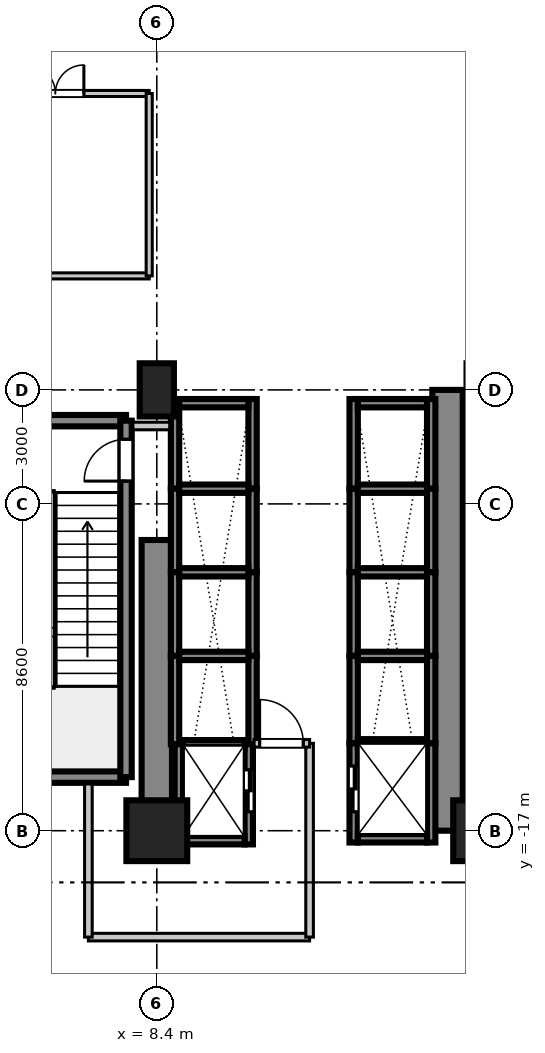
"""IFC4 building model, lengths in metres.
Left out: names, types, materials, properties, quantities, classifications, styles, units other than length and angle.
Written with IfcOpenShell. Run it as: python <this file> out.ifc"""

import sys

from ifc_helpers import new_model, si_unit, direction, frame, frame_2d, origin, origin_2d, place, context, subcontext, project, spatial, rectangle, extrude, source, transform, mapped, element, fill, save


model = new_model("IFC4")
c1 = context("Model", 3, precision=1e-05, world=origin(), true_north=direction((0.0, 1.0)))
c2 = subcontext(c1, "Body", "Model", "MODEL_VIEW")
j1 = project(units=[si_unit("LENGTHUNIT", "METRE"), si_unit("PLANEANGLEUNIT", "RADIAN")], contexts=[c1])
p1 = place(None, origin())
s1 = spatial("IfcSite", under=j1, at=p1, CompositionType="ELEMENT")
p2 = place(p1, origin())
s2 = spatial("IfcBuilding", under=s1, at=p2, CompositionType="ELEMENT")
p3 = place(p2, frame((0.0, 0.0, 10.8)))
s3 = spatial("IfcBuildingStorey", under=s2, at=p3, CompositionType="ELEMENT", Elevation=10.8)
m1 = source(origin(), c2, "Body", "SweptSolid", [
    extrude(rectangle(XDim=1.6, YDim=1.6, at=origin_2d()), origin(), (0.0, 0.0, 1.0), 5.355),
])
p4 = place(p3, frame((8.4, -17.0, 0.0), z_axis=(0.0, 0.0, 1.0), x_axis=(1.0, 0.0, 0.0)))
e1 = element("IfcColumn", 1, at=p4, inside=s3, PredefinedType="COLUMN", context=c2, shape_type="MappedRepresentation", body=[
    mapped(m1, transform((0.0, 0.0, 0.0), scale=1.0)),
])
m2 = source(origin(), c2, "Body", "SweptSolid", [
    extrude(rectangle(XDim=0.9, YDim=1.4, at=origin_2d()), origin(), (0.0, 0.0, 1.0), 5.355),
])
p5 = place(p3, frame((8.4, -5.4, 0.0), z_axis=(0.0, 0.0, 1.0), x_axis=(1.0, 0.0, 0.0)))
e2 = element("IfcColumn", 2, at=p5, inside=s3, PredefinedType="PILASTER", context=c2, shape_type="MappedRepresentation", body=[
    mapped(m2, transform((0.0, 0.0, 0.0), scale=1.0)),
])
p6 = place(p3, frame((17.0, -17.0, 0.0), z_axis=(0.0, 0.0, 1.0), x_axis=(1.0, 0.0, 0.0)))
e3 = element("IfcColumn", 3, at=p6, inside=s3, PredefinedType="COLUMN", context=c2, shape_type="MappedRepresentation", body=[
    mapped(m1, transform((0.0, 0.0, 0.0), scale=1.0)),
])
m3 = source(origin(), c2, "Body", "SweptSolid", [
    extrude(rectangle(XDim=7.65, YDim=0.8, at=frame_2d((3.825, 0.0))), origin(), (0.0, 0.0, 1.0), 5.06),
])
p7 = place(p3, frame((8.4, -17.0, 0.0), z_axis=(0.0, 0.0, 1.0), x_axis=(0.0, 1.0, 0.0)))
e4 = element("IfcWall", 4, at=p7, inside=s3, PredefinedType="SHEAR", context=c2, shape_type="MappedRepresentation", body=[
    mapped(m3, transform((0.0, 0.0, 0.0), scale=1.0)),
])
m4 = source(origin(), c2, "Body", "SweptSolid", [
    extrude(rectangle(XDim=11.6, YDim=0.8, at=frame_2d((5.8, 0.0))), origin(), (0.0, 0.0, 1.0), 5.06),
])
p8 = place(p3, frame((16.05, -17.0, 0.0), z_axis=(0.0, 0.0, 1.0), x_axis=(0.0, 1.0, 0.0)))
e5 = element("IfcWall", 5, at=p8, inside=s3, PredefinedType="SHEAR", context=c2, shape_type="MappedRepresentation", body=[
    mapped(m4, transform((0.0, 0.0, 0.0), scale=1.0)),
])
m5 = source(origin(), c2, "Body", "SweptSolid", [
    extrude(rectangle(XDim=3.98, YDim=0.3, at=frame_2d((1.99, 0.0))), origin(), (0.0, 0.0, 1.0), 5.06),
])
for number, where, z_axis, x_axis in (
    (6, (3.61, -15.59, 0.0), (0.0, 0.0, 1.0), (1.0, 0.0, 0.0)),
    (7, (3.61, -6.21, 0.0), (0.0, 0.0, 1.0), (1.0, 0.0, 0.0)),
):
    element("IfcWall", number, at=place(p3, frame(where, z_axis=z_axis, x_axis=x_axis)), inside=s3, PredefinedType="SHEAR", context=c2, shape_type="MappedRepresentation", body=[
        mapped(m5, transform((0.0, 0.0, 0.0), scale=1.0)),
    ])
m6 = source(origin(), c2, "Body", "SweptSolid", [
    extrude(rectangle(XDim=9.38, YDim=0.3, at=frame_2d((4.69, 0.0))), origin(), (0.0, 0.0, 1.0), 5.06),
])
p9 = place(p3, frame((7.59, -15.59, 0.0), z_axis=(0.0, 0.0, 1.0), x_axis=(0.0, 1.0, 0.0)))
e8 = element("IfcWall", 8, at=p9, inside=s3, PredefinedType="SHEAR", context=c2, shape_type="MappedRepresentation", body=[
    mapped(m6, transform((0.0, 0.0, 0.0), scale=1.0)),
])
p10 = place(p9, frame((7.79, 0.0, 0.0)))
e9 = element("IfcOpeningElement", 9, at=p10, cuts=e8, PredefinedType="OPENING", context=c2, shape_type="SweptSolid", body=[
    extrude(rectangle(XDim=1.1, YDim=2.15, at=frame_2d((0.55, 1.075))), frame((0.0, 0.16, 0.0), z_axis=(0.0, -1.0, 0.0), x_axis=(1.0, 0.0, 0.0)), (0.0, 0.0, 1.0), 0.32),
])
m7 = source(origin(), c2, "Body", "SweptSolid", [
    extrude(rectangle(XDim=2.36, YDim=0.22, at=frame_2d((1.18, 0.0))), origin(), (0.0, 0.0, 1.0), 5.06),
])
for number, where, z_axis, x_axis in (
    (10, (13.58, -8.0, 0.0), (0.0, 0.0, 1.0), (0.0, 1.0, 0.0)),
    (11, (15.62, -8.0, 0.0), (0.0, 0.0, 1.0), (0.0, 1.0, 0.0)),
):
    element("IfcWall", number, at=place(p3, frame(where, z_axis=z_axis, x_axis=x_axis)), inside=s3, PredefinedType="SHEAR", context=c2, shape_type="MappedRepresentation", body=[
        mapped(m7, transform((0.0, 0.0, 0.0), scale=1.0)),
    ])
m8 = source(origin(), c2, "Body", "SweptSolid", [
    extrude(rectangle(XDim=1.82, YDim=0.22, at=frame_2d((0.91, 0.0))), origin(), (0.0, 0.0, 1.0), 5.06),
])
p11 = place(p3, frame((13.69, -5.75, 0.0), z_axis=(0.0, 0.0, 1.0), x_axis=(1.0, 0.0, 0.0)))
e12 = element("IfcWall", 12, at=p11, inside=s3, PredefinedType="SHEAR", context=c2, shape_type="MappedRepresentation", body=[
    mapped(m8, transform((0.0, 0.0, 0.0), scale=1.0)),
])
m9 = source(origin(), c2, "Body", "SweptSolid", [
    extrude(rectangle(XDim=2.2, YDim=0.22, at=frame_2d((1.1, 0.0))), origin(), (0.0, 0.0, 1.0), 5.06),
])
for number, where, z_axis, x_axis in (
    (13, (13.58, -10.2, 0.0), (0.0, 0.0, 1.0), (0.0, 1.0, 0.0)),
    (14, (15.62, -10.2, 0.0), (0.0, 0.0, 1.0), (0.0, 1.0, 0.0)),
):
    element("IfcWall", number, at=place(p3, frame(where, z_axis=z_axis, x_axis=x_axis)), inside=s3, PredefinedType="SHEAR", context=c2, shape_type="MappedRepresentation", body=[
        mapped(m9, transform((0.0, 0.0, 0.0), scale=1.0)),
    ])
m10 = source(origin(), c2, "Body", "SweptSolid", [
    extrude(rectangle(XDim=1.82, YDim=0.22, at=frame_2d((0.91, 0.0))), origin(), (0.0, 0.0, 1.0), 5.4),
])
p12 = place(p3, frame((13.69, -8.0, 0.0), z_axis=(0.0, 0.0, 1.0), x_axis=(1.0, 0.0, 0.0)))
e15 = element("IfcWall", 15, at=p12, inside=s3, PredefinedType="SHEAR", context=c2, shape_type="MappedRepresentation", body=[
    mapped(m10, transform((0.0, 0.0, 0.0), scale=1.0)),
])
for number, where, z_axis, x_axis in (
    (16, (13.58, -12.4, 0.0), (0.0, 0.0, 1.0), (0.0, 1.0, 0.0)),
    (17, (15.62, -12.4, 0.0), (0.0, 0.0, 1.0), (0.0, 1.0, 0.0)),
):
    element("IfcWall", number, at=place(p3, frame(where, z_axis=z_axis, x_axis=x_axis)), inside=s3, PredefinedType="SHEAR", context=c2, shape_type="MappedRepresentation", body=[
        mapped(m9, transform((0.0, 0.0, 0.0), scale=1.0)),
    ])
p13 = place(p3, frame((13.69, -10.2, 0.0), z_axis=(0.0, 0.0, 1.0), x_axis=(1.0, 0.0, 0.0)))
e18 = element("IfcWall", 18, at=p13, inside=s3, PredefinedType="SHEAR", context=c2, shape_type="MappedRepresentation", body=[
    mapped(m10, transform((0.0, 0.0, 0.0), scale=1.0)),
])
m11 = source(origin(), c2, "Body", "SweptSolid", [
    extrude(rectangle(XDim=2.3, YDim=0.22, at=frame_2d((1.15, 0.0))), origin(), (0.0, 0.0, 1.0), 5.06),
])
for number, where, z_axis, x_axis in (
    (19, (13.58, -14.7, 0.0), (0.0, 0.0, 1.0), (0.0, 1.0, 0.0)),
    (20, (15.62, -14.7, 0.0), (0.0, 0.0, 1.0), (0.0, 1.0, 0.0)),
):
    element("IfcWall", number, at=place(p3, frame(where, z_axis=z_axis, x_axis=x_axis)), inside=s3, PredefinedType="SHEAR", context=c2, shape_type="MappedRepresentation", body=[
        mapped(m11, transform((0.0, 0.0, 0.0), scale=1.0)),
    ])
p14 = place(p3, frame((13.69, -12.4, 0.0), z_axis=(0.0, 0.0, 1.0), x_axis=(1.0, 0.0, 0.0)))
e21 = element("IfcWall", 21, at=p14, inside=s3, PredefinedType="SHEAR", context=c2, shape_type="MappedRepresentation", body=[
    mapped(m10, transform((0.0, 0.0, 0.0), scale=1.0)),
])
for number, where, z_axis, x_axis in (
    (22, (8.88, -8.0, 0.0), (0.0, 0.0, 1.0), (0.0, 1.0, 0.0)),
    (23, (10.92, -8.0, 0.0), (0.0, 0.0, 1.0), (0.0, 1.0, 0.0)),
):
    element("IfcWall", number, at=place(p3, frame(where, z_axis=z_axis, x_axis=x_axis)), inside=s3, PredefinedType="SHEAR", context=c2, shape_type="MappedRepresentation", body=[
        mapped(m7, transform((0.0, 0.0, 0.0), scale=1.0)),
    ])
p15 = place(p3, frame((8.99, -5.75, 0.0), z_axis=(0.0, 0.0, 1.0), x_axis=(1.0, 0.0, 0.0)))
e24 = element("IfcWall", 24, at=p15, inside=s3, PredefinedType="SHEAR", context=c2, shape_type="MappedRepresentation", body=[
    mapped(m8, transform((0.0, 0.0, 0.0), scale=1.0)),
])
for number, where, z_axis, x_axis in (
    (25, (8.88, -10.2, 0.0), (0.0, 0.0, 1.0), (0.0, 1.0, 0.0)),
    (26, (10.92, -10.2, 0.0), (0.0, 0.0, 1.0), (0.0, 1.0, 0.0)),
):
    element("IfcWall", number, at=place(p3, frame(where, z_axis=z_axis, x_axis=x_axis)), inside=s3, PredefinedType="SHEAR", context=c2, shape_type="MappedRepresentation", body=[
        mapped(m9, transform((0.0, 0.0, 0.0), scale=1.0)),
    ])
p16 = place(p3, frame((8.99, -8.0, 0.0), z_axis=(0.0, 0.0, 1.0), x_axis=(1.0, 0.0, 0.0)))
e27 = element("IfcWall", 27, at=p16, inside=s3, PredefinedType="SHEAR", context=c2, shape_type="MappedRepresentation", body=[
    mapped(m10, transform((0.0, 0.0, 0.0), scale=1.0)),
])
for number, where, z_axis, x_axis in (
    (28, (8.88, -12.4, 0.0), (0.0, 0.0, 1.0), (0.0, 1.0, 0.0)),
    (29, (10.92, -12.4, 0.0), (0.0, 0.0, 1.0), (0.0, 1.0, 0.0)),
):
    element("IfcWall", number, at=place(p3, frame(where, z_axis=z_axis, x_axis=x_axis)), inside=s3, PredefinedType="SHEAR", context=c2, shape_type="MappedRepresentation", body=[
        mapped(m9, transform((0.0, 0.0, 0.0), scale=1.0)),
    ])
p17 = place(p3, frame((8.99, -10.2, 0.0), z_axis=(0.0, 0.0, 1.0), x_axis=(1.0, 0.0, 0.0)))
e30 = element("IfcWall", 30, at=p17, inside=s3, PredefinedType="SHEAR", context=c2, shape_type="MappedRepresentation", body=[
    mapped(m10, transform((0.0, 0.0, 0.0), scale=1.0)),
])
m12 = source(origin(), c2, "Body", "SweptSolid", [
    extrude(rectangle(XDim=2.325, YDim=0.22, at=frame_2d((1.163, 0.0))), origin(), (0.0, 0.0, 1.0), 5.06),
])
for number, where, z_axis, x_axis in (
    (31, (8.88, -14.725, 0.0), (0.0, 0.0, 1.0), (0.0, 1.0, 0.0)),
    (32, (10.92, -14.725, 0.0), (0.0, 0.0, 1.0), (0.0, 1.0, 0.0)),
):
    element("IfcWall", number, at=place(p3, frame(where, z_axis=z_axis, x_axis=x_axis)), inside=s3, PredefinedType="SHEAR", context=c2, shape_type="MappedRepresentation", body=[
        mapped(m12, transform((0.0, 0.0, 0.0), scale=1.0)),
    ])
p18 = place(p3, frame((8.99, -12.4, 0.0), z_axis=(0.0, 0.0, 1.0), x_axis=(1.0, 0.0, 0.0)))
e33 = element("IfcWall", 33, at=p18, inside=s3, PredefinedType="SHEAR", context=c2, shape_type="MappedRepresentation", body=[
    mapped(m10, transform((0.0, 0.0, 0.0), scale=1.0)),
])
m13 = source(origin(), c2, "Body", "SweptSolid", [
    extrude(rectangle(XDim=2.635, YDim=0.22, at=frame_2d((1.317, 0.0))), origin(), (0.0, 0.0, 1.0), 5.06),
])
p19 = place(p3, frame((8.98, -17.36, 0.0), z_axis=(0.0, 0.0, 1.0), x_axis=(0.0, 1.0, 0.0)))
e34 = element("IfcWall", 34, at=p19, inside=s3, PredefinedType="SHEAR", context=c2, shape_type="MappedRepresentation", body=[
    mapped(m13, transform((0.0, 0.0, 0.0), scale=1.0)),
])
p20 = place(p3, frame((10.82, -17.36, 0.0), z_axis=(0.0, 0.0, 1.0), x_axis=(0.0, 1.0, 0.0)))
e35 = element("IfcWall", 35, at=p20, inside=s3, PredefinedType="SHEAR", context=c2, shape_type="MappedRepresentation", body=[
    mapped(m13, transform((0.0, 0.0, 0.0), scale=1.0)),
])
p21 = place(p20, frame((0.86, 0.0, 0.0)))
e36 = element("IfcOpeningElement", 36, at=p21, cuts=e35, PredefinedType="OPENING", context=c2, shape_type="SweptSolid", body=[
    extrude(rectangle(XDim=1.1, YDim=2.2, at=frame_2d((0.55, 1.1))), frame((0.0, 0.12, 0.0), z_axis=(0.0, -1.0, 0.0), x_axis=(1.0, 0.0, 0.0)), (0.0, 0.0, 1.0), 0.24),
])
m14 = source(origin(), c2, "Body", "SweptSolid", [
    extrude(rectangle(XDim=1.62, YDim=0.22, at=frame_2d((0.81, 0.0))), origin(), (0.0, 0.0, 1.0), 5.06),
])
p22 = place(p3, frame((9.09, -17.25, 0.0), z_axis=(0.0, 0.0, 1.0), x_axis=(1.0, 0.0, 0.0)))
e37 = element("IfcWall", 37, at=p22, inside=s3, PredefinedType="SHEAR", context=c2, shape_type="MappedRepresentation", body=[
    mapped(m14, transform((0.0, 0.0, 0.0), scale=1.0)),
])
m15 = source(origin(), c2, "Body", "SweptSolid", [
    extrude(rectangle(XDim=1.62, YDim=0.22, at=frame_2d((0.81, 0.0))), origin(), (0.0, 0.0, 1.0), 5.4),
])
p23 = place(p3, frame((9.09, -14.725, 0.0), z_axis=(0.0, 0.0, 1.0), x_axis=(1.0, 0.0, 0.0)))
e38 = element("IfcWall", 38, at=p23, inside=s3, PredefinedType="SHEAR", context=c2, shape_type="MappedRepresentation", body=[
    mapped(m15, transform((0.0, 0.0, 0.0), scale=1.0)),
])
m16 = source(origin(), c2, "Body", "SweptSolid", [
    extrude(rectangle(XDim=2.61, YDim=0.22, at=frame_2d((1.305, 0.0))), origin(), (0.0, 0.0, 1.0), 5.06),
])
p24 = place(p3, frame((13.58, -17.31, 0.0), z_axis=(0.0, 0.0, 1.0), x_axis=(0.0, 1.0, 0.0)))
e39 = element("IfcWall", 39, at=p24, inside=s3, PredefinedType="SHEAR", context=c2, shape_type="MappedRepresentation", body=[
    mapped(m16, transform((0.0, 0.0, 0.0), scale=1.0)),
])
p25 = place(p24, frame((0.81, 0.0, 0.0)))
e40 = element("IfcOpeningElement", 40, at=p25, cuts=e39, PredefinedType="OPENING", context=c2, shape_type="SweptSolid", body=[
    extrude(rectangle(XDim=1.2, YDim=2.2, at=frame_2d((0.6, 1.1))), frame((0.0, 0.12, 0.0), z_axis=(0.0, -1.0, 0.0), x_axis=(1.0, 0.0, 0.0)), (0.0, 0.0, 1.0), 0.24),
])
p26 = place(p3, frame((15.62, -17.31, 0.0), z_axis=(0.0, 0.0, 1.0), x_axis=(0.0, 1.0, 0.0)))
e41 = element("IfcWall", 41, at=p26, inside=s3, PredefinedType="SHEAR", context=c2, shape_type="MappedRepresentation", body=[
    mapped(m16, transform((0.0, 0.0, 0.0), scale=1.0)),
])
p27 = place(p3, frame((13.69, -17.2, 0.0), z_axis=(0.0, 0.0, 1.0), x_axis=(1.0, 0.0, 0.0)))
e42 = element("IfcWall", 42, at=p27, inside=s3, PredefinedType="SHEAR", context=c2, shape_type="MappedRepresentation", body=[
    mapped(m8, transform((0.0, 0.0, 0.0), scale=1.0)),
])
p28 = place(p3, frame((13.69, -14.7, 0.0), z_axis=(0.0, 0.0, 1.0), x_axis=(1.0, 0.0, 0.0)))
e43 = element("IfcWall", 43, at=p28, inside=s3, PredefinedType="SHEAR", context=c2, shape_type="MappedRepresentation", body=[
    mapped(m10, transform((0.0, 0.0, 0.0), scale=1.0)),
])
m17 = source(origin(), c2, "Body", "SweptSolid", [
    extrude(rectangle(XDim=5.82, YDim=0.2, at=frame_2d((2.91, 0.0))), origin(), (0.0, 0.0, 1.0), 3.4),
])
p29 = place(p3, frame((6.6, -19.8, 0.0), z_axis=(0.0, 0.0, 1.0), x_axis=(1.0, 0.0, 0.0)))
e44 = element("IfcWall", 44, at=p29, inside=s3, PredefinedType="PARTITIONING", context=c2, shape_type="MappedRepresentation", body=[
    mapped(m17, transform((0.0, 0.0, 0.0), scale=1.0)),
])
m18 = source(origin(), c2, "Body", "SweptSolid", [
    extrude(rectangle(XDim=4.03, YDim=0.2, at=frame_2d((2.015, 0.0))), origin(), (0.0, 0.0, 1.0), 3.4),
])
p30 = place(p3, frame((6.6, -19.8, 0.0), z_axis=(0.0, 0.0, 1.0), x_axis=(0.0, 1.0, 0.0)))
e45 = element("IfcWall", 45, at=p30, inside=s3, PredefinedType="PARTITIONING", context=c2, shape_type="MappedRepresentation", body=[
    mapped(m18, transform((0.0, 0.0, 0.0), scale=1.0)),
])
m19 = source(origin(), c2, "Body", "SweptSolid", [
    extrude(rectangle(XDim=5.1, YDim=0.2, at=frame_2d((2.55, 0.0))), origin(), (0.0, 0.0, 1.0), 3.4),
])
p31 = place(p3, frame((12.42, -19.8, 0.0), z_axis=(0.0, 0.0, 1.0), x_axis=(0.0, 1.0, 0.0)))
e46 = element("IfcWall", 46, at=p31, inside=s3, PredefinedType="PARTITIONING", context=c2, shape_type="MappedRepresentation", body=[
    mapped(m19, transform((0.0, 0.0, 0.0), scale=1.0)),
])
m20 = source(origin(), c2, "Body", "SweptSolid", [
    extrude(rectangle(XDim=1.46, YDim=0.2, at=frame_2d((0.73, 0.0))), origin(), (0.0, 0.0, 1.0), 3.4),
])
p32 = place(p3, frame((10.96, -14.7, 0.0), z_axis=(0.0, 0.0, 1.0), x_axis=(1.0, 0.0, 0.0)))
e47 = element("IfcWall", 47, at=p32, inside=s3, PredefinedType="PARTITIONING", context=c2, shape_type="MappedRepresentation", body=[
    mapped(m20, transform((0.0, 0.0, 0.0), scale=1.0)),
])
p33 = place(p32, frame((0.145, 0.0, 0.0)))
e48 = element("IfcOpeningElement", 48, at=p33, cuts=e47, PredefinedType="OPENING", context=c2, shape_type="SweptSolid", body=[
    extrude(rectangle(XDim=1.15, YDim=2.15, at=frame_2d((0.575, 1.075))), frame((0.0, 0.11, 0.0), z_axis=(0.0, -1.0, 0.0), x_axis=(1.0, 0.0, 0.0)), (0.0, 0.0, 1.0), 0.22),
])
m21 = source(origin(), c2, "Body", "SweptSolid", [
    extrude(rectangle(XDim=0.97, YDim=0.2, at=frame_2d((0.485, 0.0))), origin(), (0.0, 0.0, 1.0), 3.4),
])
p34 = place(p3, frame((7.77, -6.35, 0.0), z_axis=(0.0, 0.0, 1.0), x_axis=(1.0, 0.0, 0.0)))
e49 = element("IfcWall", 49, at=p34, inside=s3, PredefinedType="PARTITIONING", context=c2, shape_type="MappedRepresentation", body=[
    mapped(m21, transform((0.0, 0.0, 0.0), scale=1.0)),
])
m22 = source(origin(), c2, "Body", "SweptSolid", [
    extrude(rectangle(XDim=12.2, YDim=0.16, at=frame_2d((6.1, 0.0))), origin(), (0.0, 0.0, 1.0), 3.4),
])
p35 = place(p3, frame((-4.0, -2.4, 0.0), z_axis=(0.0, 0.0, 1.0), x_axis=(1.0, 0.0, 0.0)))
e50 = element("IfcWall", 50, at=p35, inside=s3, PredefinedType="PARTITIONING", context=c2, shape_type="MappedRepresentation", body=[
    mapped(m22, transform((0.0, 0.0, 0.0), scale=1.0)),
])
p36 = place(p3, frame((-4.0, 2.4, 0.0), z_axis=(0.0, 0.0, 1.0), x_axis=(1.0, 0.0, 0.0)))
e51 = element("IfcWall", 51, at=p36, inside=s3, PredefinedType="PARTITIONING", context=c2, shape_type="MappedRepresentation", body=[
    mapped(m22, transform((0.0, 0.0, 0.0), scale=1.0)),
])
p37 = place(p36, frame((8.981, 0.0, 0.0)))
e52 = element("IfcOpeningElement", 52, at=p37, cuts=e51, PredefinedType="OPENING", context=c2, shape_type="SweptSolid", body=[
    extrude(rectangle(XDim=1.5, YDim=2.15, at=frame_2d((0.75, 1.075))), frame((0.0, 0.09, 0.0), z_axis=(0.0, -1.0, 0.0), x_axis=(1.0, 0.0, 0.0)), (0.0, 0.0, 1.0), 0.18),
])
m23 = source(origin(), c2, "Body", "SweptSolid", [
    extrude(rectangle(XDim=4.8, YDim=0.16, at=frame_2d((2.4, 0.0))), origin(), (0.0, 0.0, 1.0), 3.4),
])
p38 = place(p3, frame((8.2, -2.4, 0.0), z_axis=(0.0, 0.0, 1.0), x_axis=(0.0, 1.0, 0.0)))
e53 = element("IfcWall", 53, at=p38, inside=s3, PredefinedType="PARTITIONING", context=c2, shape_type="MappedRepresentation", body=[
    mapped(m23, transform((0.0, 0.0, 0.0), scale=1.0)),
])
m24 = source(origin(), c2, "Body", "SweptSolid", [
    extrude(rectangle(XDim=1.1, YDim=2.15, at=frame_2d((0.55, 1.075))), frame((0.0, 0.025, 0.0), z_axis=(0.0, -1.0, 0.0), x_axis=(1.0, 0.0, 0.0)), (0.0, 0.0, 1.0), 0.05),
])
p39 = place(p10, origin())
e54 = element("IfcDoor", 54, at=p39, inside=s3, OperationType="SINGLE_SWING_LEFT", PredefinedType="DOOR", context=c2, shape_type="MappedRepresentation", body=[
    mapped(m24, transform((0.0, 0.0, 0.0), scale=1.0)),
])
fill(e9, e54)
m25 = source(origin(), c2, "Body", "SweptSolid", [
    extrude(rectangle(XDim=1.1, YDim=2.2, at=frame_2d((0.55, 1.1))), frame((0.0, 0.025, 0.0), z_axis=(0.0, -1.0, 0.0), x_axis=(1.0, 0.0, 0.0)), (0.0, 0.0, 1.0), 0.05),
])
p40 = place(p21, frame((1.1, 0.0, 0.0), z_axis=(0.0, 0.0, 1.0), x_axis=(-1.0, 0.0, 0.0)))
e55 = element("IfcDoor", 55, at=p40, inside=s3, OperationType="DOUBLE_DOOR_SLIDING", PredefinedType="DOOR", context=c2, shape_type="MappedRepresentation", body=[
    mapped(m25, transform((0.0, 0.0, 0.0), scale=1.0)),
])
fill(e36, e55)
m26 = source(origin(), c2, "Body", "SweptSolid", [
    extrude(rectangle(XDim=1.2, YDim=2.2, at=frame_2d((0.6, 1.1))), frame((0.0, 0.025, 0.0), z_axis=(0.0, -1.0, 0.0), x_axis=(1.0, 0.0, 0.0)), (0.0, 0.0, 1.0), 0.05),
])
p41 = place(p25, origin())
e56 = element("IfcDoor", 56, at=p41, inside=s3, OperationType="DOUBLE_DOOR_SLIDING", PredefinedType="DOOR", context=c2, shape_type="MappedRepresentation", body=[
    mapped(m26, transform((0.0, 0.0, 0.0), scale=1.0)),
])
fill(e40, e56)
m27 = source(origin(), c2, "Body", "SweptSolid", [
    extrude(rectangle(XDim=1.15, YDim=2.15, at=frame_2d((0.575, 1.075))), frame((0.0, 0.025, 0.0), z_axis=(0.0, -1.0, 0.0), x_axis=(1.0, 0.0, 0.0)), (0.0, 0.0, 1.0), 0.05),
])
p42 = place(p33, origin())
e57 = element("IfcDoor", 57, at=p42, inside=s3, OperationType="SINGLE_SWING_LEFT", PredefinedType="DOOR", context=c2, shape_type="MappedRepresentation", body=[
    mapped(m27, transform((0.0, 0.0, 0.0), scale=1.0)),
])
fill(e48, e57)
m28 = source(origin(), c2, "Body", "SweptSolid", [
    extrude(rectangle(XDim=1.5, YDim=2.15, at=frame_2d((0.75, 1.075))), frame((0.0, 0.025, 0.0), z_axis=(0.0, -1.0, 0.0), x_axis=(1.0, 0.0, 0.0)), (0.0, 0.0, 1.0), 0.05),
])
p43 = place(p37, frame((1.5, 0.0, 0.0), z_axis=(0.0, 0.0, 1.0), x_axis=(-1.0, 0.0, 0.0)))
e58 = element("IfcDoor", 58, at=p43, inside=s3, OperationType="DOUBLE_DOOR_SINGLE_SWING", PredefinedType="DOOR", context=c2, shape_type="MappedRepresentation", body=[
    mapped(m28, transform((0.0, 0.0, 0.0), scale=1.0)),
])
fill(e52, e58)
save(model, sys.argv[1])
